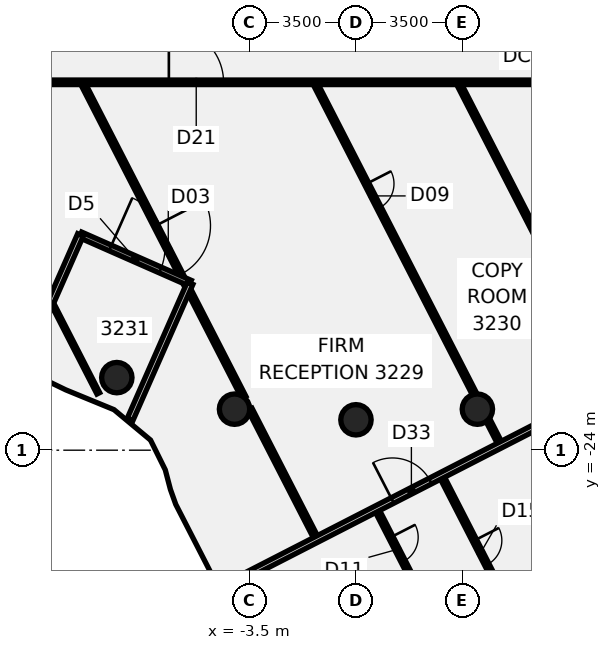
"""IFC4 building model, lengths in metres.
Left out: names, types, materials, properties, quantities, classifications, styles, units other than length and angle.
Written with IfcOpenShell. Run it as: python <this file> out.ifc"""

import sys

from ifc_helpers import new_model, si_unit, direction, frame, frame_2d, origin, origin_2d, place, context, subcontext, project, spatial, rectangle, circle, extrude, element, fill, save


model = new_model("IFC4")
c1 = context("Model", 3, precision=1e-05, world=origin(), true_north=direction((0.0, 1.0)))
c2 = subcontext(c1, "Body", "Model", "MODEL_VIEW")
j1 = project(units=[si_unit("LENGTHUNIT", "METRE"), si_unit("PLANEANGLEUNIT", "RADIAN")], contexts=[c1])
p1 = place(None, origin())
s1 = spatial("IfcSite", under=j1, at=p1, CompositionType="ELEMENT")
p2 = place(p1, origin())
s2 = spatial("IfcBuilding", under=s1, at=p2, CompositionType="ELEMENT")
p3 = place(p2, frame((0.0, 0.0, 133.0)))
s3 = spatial("IfcBuildingStorey", under=s2, at=p3, CompositionType="ELEMENT", Elevation=133.0)
for number, where, z_axis, x_axis in (
    (1, (-7.866, -21.613, -0.14), (0.0, 0.0, 1.0), (1.0, 0.0, 0.0)),
    (2, (-3.994, -22.651, -0.14), (0.0, 0.0, 1.0), (1.0, 0.0, 0.0)),
    (3, (0.0, -23.0, -0.14), (0.0, 0.0, 1.0), (1.0, 0.0, 0.0)),
    (4, (3.994, -22.651, -0.14), (0.0, 0.0, 1.0), (1.0, 0.0, 0.0)),
):
    element("IfcColumn", number, at=place(p3, frame(where, z_axis=z_axis, x_axis=x_axis)), inside=s3, PredefinedType="COLUMN", context=c2, shape_type="SweptSolid", body=[
        extrude(circle(Radius=0.5, at=origin_2d()), origin(), (0.0, 0.0, 1.0), 3.75),
    ])
p4 = place(p3, frame((-13.13, -13.059, 0.0), z_axis=(0.0, 0.0, 1.0), x_axis=(0.456518382735, -0.88971398001, 0.0)))
e5 = element("IfcWall", 5, at=p4, inside=s3, PredefinedType="PARTITIONING", context=c2, shape_type="SweptSolid", body=[
    extrude(rectangle(XDim=10.196, YDim=0.1, at=frame_2d((5.098, 0.0))), origin(), (0.0, 0.0, 1.0), 3.01),
])
p5 = place(p3, frame((-8.956, -11.993, 0.0), z_axis=(0.0, 0.0, 1.0), x_axis=(0.456540854067, -0.889702449456, 0.0)))
e6 = element("IfcWall", 6, at=p5, inside=s3, PredefinedType="PARTITIONING", context=c2, shape_type="SweptSolid", body=[
    extrude(rectangle(XDim=11.539, YDim=0.15, at=frame_2d((5.77, 0.0))), origin(), (0.0, 0.0, 1.0), 3.01),
])
p6 = place(p5, frame((5.195, 0.0, 0.0)))
e7 = element("IfcOpeningElement", 7, at=p6, cuts=e6, PredefinedType="OPENING", context=c2, shape_type="SweptSolid", body=[
    extrude(rectangle(XDim=1.8, YDim=2.1, at=frame_2d((0.9, 1.05))), frame((0.0, 0.085, 0.0), z_axis=(0.0, -1.0, 0.0), x_axis=(1.0, 0.0, 0.0)), (0.0, 0.0, 1.0), 0.17),
])
p7 = place(p3, frame((-3.485, -22.655, 0.0), z_axis=(0.0, 0.0, 1.0), x_axis=(0.456522971759, -0.889711625335, 0.0)))
e8 = element("IfcWall", 8, at=p7, inside=s3, PredefinedType="PARTITIONING", context=c2, shape_type="SweptSolid", body=[
    extrude(rectangle(XDim=4.708, YDim=0.15, at=frame_2d((2.354, 0.0))), origin(), (0.0, 0.0, 1.0), 3.01),
])
p8 = place(p3, frame((-1.313, -11.993, 0.0), z_axis=(0.0, 0.0, 1.0), x_axis=(0.456517816725, -0.889714270433, 0.0)))
e9 = element("IfcWall", 9, at=p8, inside=s3, PredefinedType="PARTITIONING", context=c2, shape_type="SweptSolid", body=[
    extrude(rectangle(XDim=11.432, YDim=0.15, at=frame_2d((5.716, 0.0))), origin(), (0.0, 0.0, 1.0), 3.01),
])
p9 = place(p8, frame((3.645, 0.0, 0.0)))
e10 = element("IfcOpeningElement", 10, at=p9, cuts=e9, PredefinedType="OPENING", context=c2, shape_type="SweptSolid", body=[
    extrude(rectangle(XDim=0.9, YDim=2.1, at=frame_2d((0.45, 1.05))), frame((0.0, 0.085, 0.0), z_axis=(0.0, -1.0, 0.0), x_axis=(1.0, 0.0, 0.0)), (0.0, 0.0, 1.0), 0.17),
])
p10 = place(p3, frame((4.337, -23.004, 0.0), z_axis=(0.0, 0.0, 1.0), x_axis=(0.456575953503, -0.889684437698, 0.0)))
e11 = element("IfcWall", 11, at=p10, inside=s3, PredefinedType="PARTITIONING", context=c2, shape_type="SweptSolid", body=[
    extrude(rectangle(XDim=0.822, YDim=0.15, at=frame_2d((0.411, 0.0))), origin(), (0.0, 0.0, 1.0), 3.01),
])
p11 = place(p3, frame((0.713, -26.018, 0.0), z_axis=(0.0, 0.0, 1.0), x_axis=(0.456676166245, -0.889633002526, 0.0)))
e12 = element("IfcWall", 12, at=p11, inside=s3, PredefinedType="PARTITIONING", context=c2, shape_type="SweptSolid", body=[
    extrude(rectangle(XDim=3.86, YDim=0.15, at=frame_2d((1.93, 0.0))), origin(), (0.0, 0.0, 1.0), 3.01),
])
p12 = place(p11, frame((0.95, 0.0, 0.0)))
e13 = element("IfcOpeningElement", 13, at=p12, cuts=e12, PredefinedType="OPENING", context=c2, shape_type="SweptSolid", body=[
    extrude(rectangle(XDim=0.9, YDim=2.1, at=frame_2d((0.45, 1.05))), frame((0.0, 0.085, 0.0), z_axis=(0.0, -1.0, 0.0), x_axis=(1.0, 0.0, 0.0)), (0.0, 0.0, 1.0), 0.17),
])
p13 = place(p3, frame((2.849, -24.922, 0.0), z_axis=(0.0, 0.0, 1.0), x_axis=(0.456500214421, -0.889723302063, 0.0)))
e14 = element("IfcWall", 14, at=p13, inside=s3, PredefinedType="PARTITIONING", context=c2, shape_type="SweptSolid", body=[
    extrude(rectangle(XDim=17.82, YDim=0.15, at=frame_2d((8.91, 0.0))), origin(), (0.0, 0.0, 1.0), 3.01),
])
p14 = place(p13, frame((2.3, 0.0, 0.0)))
e15 = element("IfcOpeningElement", 15, at=p14, cuts=e14, PredefinedType="OPENING", context=c2, shape_type="SweptSolid", body=[
    extrude(rectangle(XDim=0.9, YDim=2.1, at=frame_2d((0.45, 1.05))), frame((0.0, 0.085, 0.0), z_axis=(0.0, -1.0, 0.0), x_axis=(1.0, 0.0, 0.0)), (0.0, 0.0, 1.0), 0.17),
])
p15 = place(p13, frame((5.6, 0.0, 0.0)))
e16 = element("IfcOpeningElement", 16, at=p15, cuts=e14, PredefinedType="OPENING", context=c2, shape_type="SweptSolid", body=[
    extrude(rectangle(XDim=0.9, YDim=2.1, at=frame_2d((0.45, 1.05))), frame((0.0, 0.085, 0.0), z_axis=(0.0, -1.0, 0.0), x_axis=(1.0, 0.0, 0.0)), (0.0, 0.0, 1.0), 0.17),
])
p16 = place(p13, frame((11.299, 0.0, 0.0)))
e17 = element("IfcOpeningElement", 17, at=p16, cuts=e14, PredefinedType="OPENING", context=c2, shape_type="SweptSolid", body=[
    extrude(rectangle(XDim=0.9, YDim=2.1, at=frame_2d((0.45, 1.05))), frame((0.0, 0.085, 0.0), z_axis=(0.0, -1.0, 0.0), x_axis=(1.0, 0.0, 0.0)), (0.0, 0.0, 1.0), 0.17),
])
p17 = place(p13, frame((14.6, 0.0, 0.0)))
e18 = element("IfcOpeningElement", 18, at=p17, cuts=e14, PredefinedType="OPENING", context=c2, shape_type="SweptSolid", body=[
    extrude(rectangle(XDim=0.9, YDim=2.1, at=frame_2d((0.45, 1.05))), frame((0.0, 0.085, 0.0), z_axis=(0.0, -1.0, 0.0), x_axis=(1.0, 0.0, 0.0)), (0.0, 0.0, 1.0), 0.17),
])
p18 = place(p3, frame((3.407, -11.993, 0.0), z_axis=(0.0, 0.0, 1.0), x_axis=(0.456609270215, -0.889667339152, 0.0)))
e19 = element("IfcWall", 19, at=p18, inside=s3, PredefinedType="PARTITIONING", context=c2, shape_type="SweptSolid", body=[
    extrude(rectangle(XDim=10.314, YDim=0.15, at=frame_2d((5.157, 0.0))), origin(), (0.0, 0.0, 1.0), 3.01),
])
p19 = place(p3, frame((-17.1, -11.9, 0.0), z_axis=(0.0, 0.0, 1.0), x_axis=(1.0, 0.0, 0.0)))
e20 = element("IfcWall", 20, at=p19, inside=s3, PredefinedType="PARTITIONING", context=c2, shape_type="SweptSolid", body=[
    extrude(rectangle(XDim=34.165, YDim=0.15, at=frame_2d((17.083, 0.0))), origin(), (0.0, 0.0, 1.0), 3.01),
])
p20 = place(p19, frame((10.946, 0.0, 0.0)))
e21 = element("IfcOpeningElement", 21, at=p20, cuts=e20, PredefinedType="OPENING", context=c2, shape_type="SweptSolid", body=[
    extrude(rectangle(XDim=1.8, YDim=2.1, at=frame_2d((0.9, 1.05))), frame((0.0, 0.085, 0.0), z_axis=(0.0, -1.0, 0.0), x_axis=(1.0, 0.0, 0.0)), (0.0, 0.0, 1.0), 0.17),
])
p21 = place(p19, frame((1.65, 0.0, 0.0)))
e22 = element("IfcOpeningElement", 22, at=p21, cuts=e20, PredefinedType="OPENING", context=c2, shape_type="SweptSolid", body=[
    extrude(rectangle(XDim=1.8, YDim=2.1, at=frame_2d((0.9, 1.05))), frame((0.0, 0.085, 0.0), z_axis=(0.0, -1.0, 0.0), x_axis=(1.0, 0.0, 0.0)), (0.0, 0.0, 1.0), 0.17),
])
p22 = place(p19, frame((26.309, 0.0, 0.0)))
e23 = element("IfcOpeningElement", 23, at=p22, cuts=e20, PredefinedType="OPENING", context=c2, shape_type="SweptSolid", body=[
    extrude(rectangle(XDim=1.8, YDim=2.1, at=frame_2d((0.9, 1.05))), frame((0.0, 0.085, 0.0), z_axis=(0.0, -1.0, 0.0), x_axis=(1.0, 0.0, 0.0)), (0.0, 0.0, 1.0), 0.17),
])
p23 = place(p3, frame((-4.225, -28.439, 0.0), z_axis=(0.0, 0.0, 1.0), x_axis=(0.889694266908, 0.456556799787, 0.0)))
e24 = element("IfcWall", 24, at=p23, inside=s3, PredefinedType="PARTITIONING", context=c2, shape_type="SweptSolid", body=[
    extrude(rectangle(XDim=14.219, YDim=0.2, at=frame_2d((7.11, 0.0))), origin(), (0.0, 0.0, 1.0), 3.01),
])
p24 = place(p23, frame((6.099, 0.0, 0.0)))
e25 = element("IfcOpeningElement", 25, at=p24, cuts=e24, PredefinedType="OPENING", context=c2, shape_type="SweptSolid", body=[
    extrude(rectangle(XDim=1.4, YDim=2.1, at=frame_2d((0.7, 1.05))), frame((0.0, 0.11, 0.0), z_axis=(0.0, -1.0, 0.0), x_axis=(1.0, 0.0, 0.0)), (0.0, 0.0, 1.0), 0.22),
])
p25 = place(p3, frame((4.928, -28.801, 0.0), z_axis=(0.0, 0.0, 1.0), x_axis=(0.88969767161, 0.456550164968, 0.0)))
e26 = element("IfcWall", 26, at=p25, inside=s3, PredefinedType="PARTITIONING", context=c2, shape_type="SweptSolid", body=[
    extrude(rectangle(XDim=3.693, YDim=0.1, at=frame_2d((1.846, 0.0))), origin(), (0.0, 0.0, 1.0), 3.01),
])
p26 = place(p3, frame((-9.061, -16.918, 0.0), z_axis=(0.0, 0.0, 1.0), x_axis=(0.915163294104, -0.403083297999, 0.0)))
e27 = element("IfcWall", 27, at=p26, inside=s3, PredefinedType="SOLIDWALL", context=c2, shape_type="SweptSolid", body=[
    extrude(rectangle(XDim=3.94, YDim=0.2, at=frame_2d((1.97, 0.0))), origin(), (0.0, 0.0, 1.0), 3.61),
])
p27 = place(p26, frame((1.07, 0.0, 0.0)))
e28 = element("IfcOpeningElement", 28, at=p27, cuts=e27, PredefinedType="OPENING", context=c2, shape_type="SweptSolid", body=[
    extrude(rectangle(XDim=1.8, YDim=2.4, at=frame_2d((0.9, 1.2))), frame((0.0, 0.11, 0.0), z_axis=(0.0, -1.0, 0.0), x_axis=(1.0, 0.0, 0.0)), (0.0, 0.0, 1.0), 0.22),
])
p28 = place(p3, frame((-9.062, -16.918, 0.0), z_axis=(0.0, 0.0, 1.0), x_axis=(-0.40309695737, -0.915157277717, 0.0)))
e29 = element("IfcWall", 29, at=p28, inside=s3, PredefinedType="SOLIDWALL", context=c2, shape_type="SweptSolid", body=[
    extrude(rectangle(XDim=4.703, YDim=0.2, at=frame_2d((2.352, 0.0))), origin(), (0.0, 0.0, 1.0), 3.61),
])
p29 = place(p3, frame((-5.456, -18.506, 0.0), z_axis=(0.0, 0.0, 1.0), x_axis=(-0.403071348588, -0.915168557124, 0.0)))
e30 = element("IfcWall", 30, at=p29, inside=s3, PredefinedType="SOLIDWALL", context=c2, shape_type="SweptSolid", body=[
    extrude(rectangle(XDim=4.893, YDim=0.2, at=frame_2d((2.446, 0.0))), origin(), (0.0, 0.0, 1.0), 3.61),
])
p30 = place(p6, frame((1.8, 0.0, 0.0), z_axis=(0.0, 0.0, 1.0), x_axis=(-1.0, 0.0, 0.0)))
e31 = element("IfcDoor", 31, at=p30, inside=s3, OperationType="DOUBLE_DOOR_SINGLE_SWING", PredefinedType="DOOR", context=c2, shape_type="SweptSolid", body=[
    extrude(rectangle(XDim=1.8, YDim=2.1, at=frame_2d((0.9, 1.05))), frame((0.0, 0.025, 0.0), z_axis=(0.0, -1.0, 0.0), x_axis=(1.0, 0.0, 0.0)), (0.0, 0.0, 1.0), 0.05),
])
fill(e7, e31)
p31 = place(p9, origin())
e32 = element("IfcDoor", 32, at=p31, inside=s3, OperationType="SINGLE_SWING_RIGHT", PredefinedType="DOOR", context=c2, shape_type="SweptSolid", body=[
    extrude(rectangle(XDim=0.9, YDim=2.1, at=frame_2d((0.45, 1.05))), frame((0.0, 0.025, 0.0), z_axis=(0.0, -1.0, 0.0), x_axis=(1.0, 0.0, 0.0)), (0.0, 0.0, 1.0), 0.05),
])
fill(e10, e32)
p32 = place(p12, frame((0.9, 0.0, 0.0), z_axis=(0.0, 0.0, 1.0), x_axis=(-1.0, 0.0, 0.0)))
e33 = element("IfcDoor", 33, at=p32, inside=s3, OperationType="SINGLE_SWING_LEFT", PredefinedType="DOOR", context=c2, shape_type="SweptSolid", body=[
    extrude(rectangle(XDim=0.9, YDim=2.1, at=frame_2d((0.45, 1.05))), frame((0.0, 0.025, 0.0), z_axis=(0.0, -1.0, 0.0), x_axis=(1.0, 0.0, 0.0)), (0.0, 0.0, 1.0), 0.05),
])
fill(e13, e33)
p33 = place(p14, origin())
e34 = element("IfcDoor", 34, at=p33, inside=s3, OperationType="SINGLE_SWING_RIGHT", PredefinedType="DOOR", context=c2, shape_type="SweptSolid", body=[
    extrude(rectangle(XDim=0.9, YDim=2.1, at=frame_2d((0.45, 1.05))), frame((0.0, 0.025, 0.0), z_axis=(0.0, -1.0, 0.0), x_axis=(1.0, 0.0, 0.0)), (0.0, 0.0, 1.0), 0.05),
])
fill(e15, e34)
p34 = place(p20, origin())
e35 = element("IfcDoor", 35, at=p34, inside=s3, OperationType="DOUBLE_DOOR_SINGLE_SWING", PredefinedType="DOOR", context=c2, shape_type="SweptSolid", body=[
    extrude(rectangle(XDim=1.8, YDim=2.1, at=frame_2d((0.9, 1.05))), frame((0.0, 0.025, 0.0), z_axis=(0.0, -1.0, 0.0), x_axis=(1.0, 0.0, 0.0)), (0.0, 0.0, 1.0), 0.05),
])
fill(e21, e35)
p35 = place(p24, origin())
e36 = element("IfcDoor", 36, at=p35, inside=s3, OperationType="DOUBLE_DOOR_SINGLE_SWING", PredefinedType="DOOR", context=c2, shape_type="SweptSolid", body=[
    extrude(rectangle(XDim=1.4, YDim=2.1, at=frame_2d((0.7, 1.05))), frame((0.0, 0.025, 0.0), z_axis=(0.0, -1.0, 0.0), x_axis=(1.0, 0.0, 0.0)), (0.0, 0.0, 1.0), 0.05),
])
fill(e25, e36)
p36 = place(p27, origin())
e37 = element("IfcDoor", 37, at=p36, inside=s3, OperationType="SINGLE_SWING_LEFT", PredefinedType="DOOR", context=c2, shape_type="SweptSolid", body=[
    extrude(rectangle(XDim=1.8, YDim=2.4, at=frame_2d((0.9, 1.2))), frame((0.0, 0.025, 0.0), z_axis=(0.0, -1.0, 0.0), x_axis=(1.0, 0.0, 0.0)), (0.0, 0.0, 1.0), 0.05),
])
fill(e28, e37)
save(model, sys.argv[1])
